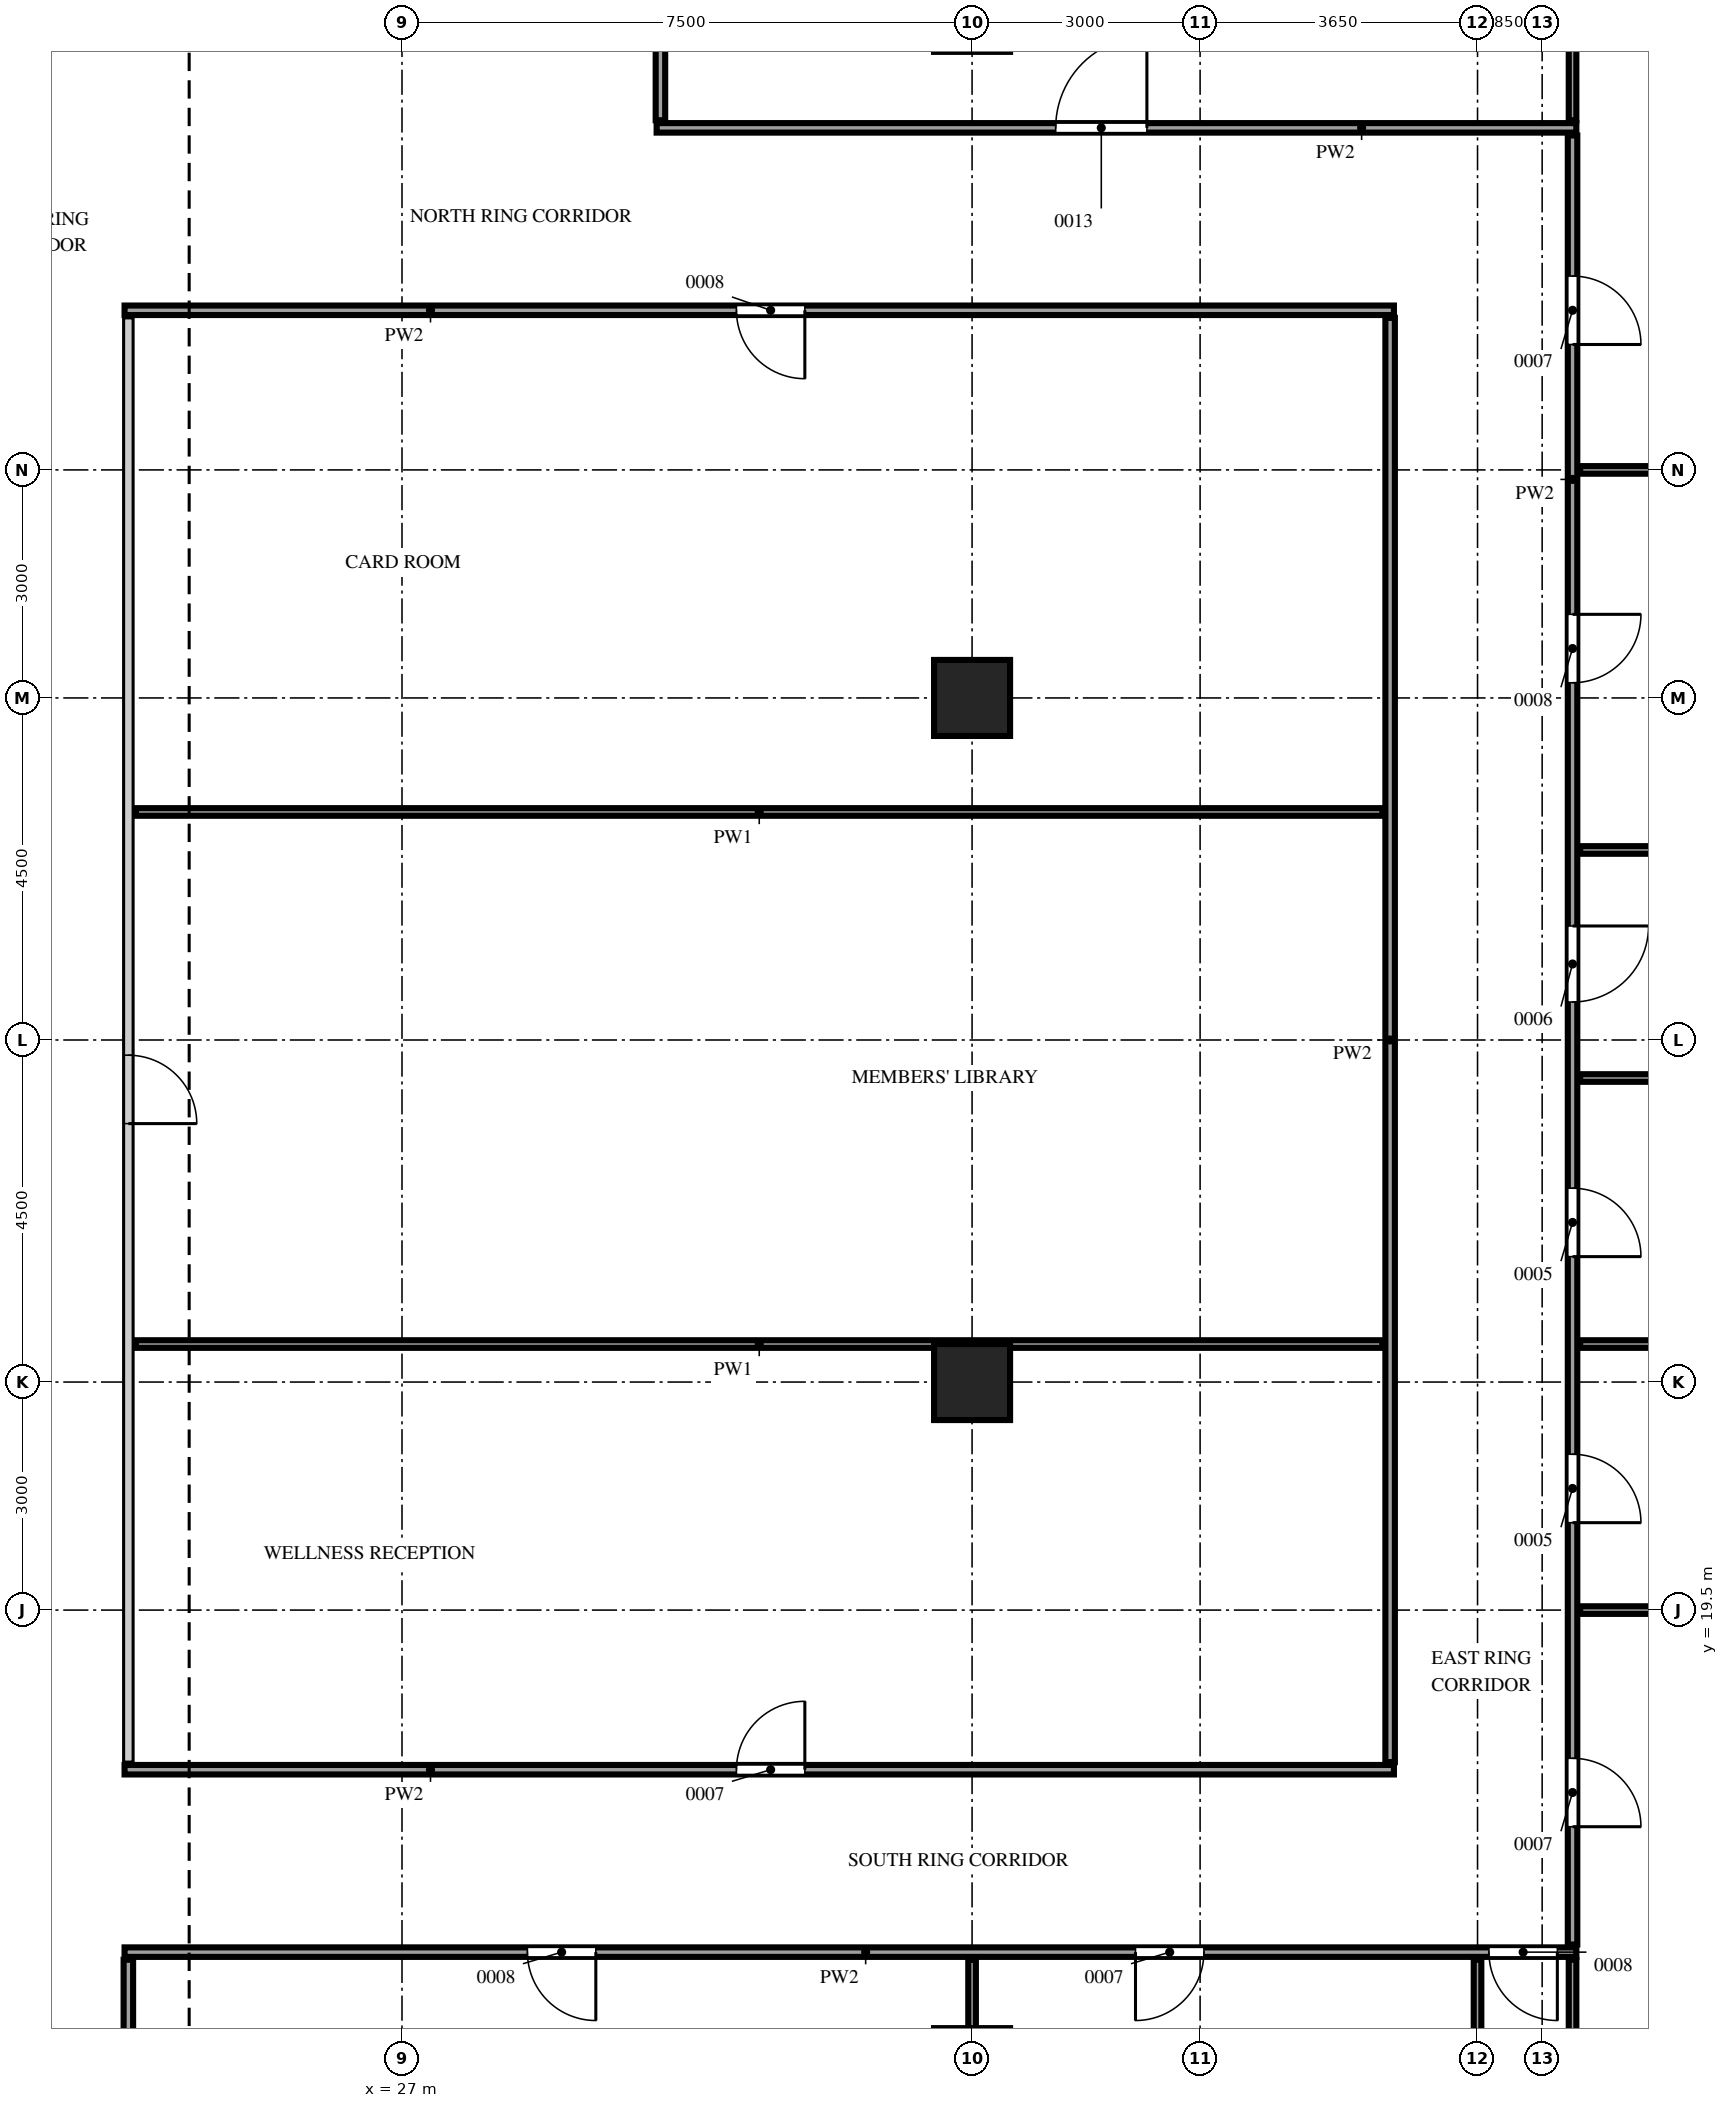
"""IFC4 building model, lengths in metres.
Left out: names, types, materials, properties, quantities, classifications, styles, units other than length and angle.
Written with IfcOpenShell. Run it as: python <this file> out.ifc"""

import sys

from ifc_helpers import new_model, si_unit, direction, frame, frame_2d, origin, origin_2d, place, context, subcontext, project, spatial, rectangle, extrude, source, transform, mapped, element, fill, save


model = new_model("IFC4")
c1 = context("Model", 3, precision=1e-05, world=origin(), true_north=direction((0.0, 1.0)))
c2 = subcontext(c1, "Body", "Model", "MODEL_VIEW")
j1 = project(units=[si_unit("LENGTHUNIT", "METRE"), si_unit("PLANEANGLEUNIT", "RADIAN")], contexts=[c1])
p1 = place(None, origin())
s1 = spatial("IfcSite", under=j1, at=p1, CompositionType="ELEMENT")
p2 = place(p1, origin())
s2 = spatial("IfcBuilding", under=s1, at=p2, CompositionType="ELEMENT")
p3 = place(p2, frame((0.0, 0.0, 294.2)))
s3 = spatial("IfcBuildingStorey", under=s2, at=p3, CompositionType="ELEMENT", Elevation=294.2)
m1 = source(origin(), c2, "Body", "SweptSolid", [
    extrude(rectangle(XDim=1.0, YDim=1.0, at=origin_2d()), origin(), (0.0, 0.0, 1.0), 3.75),
])
for number, where, z_axis, x_axis in (
    (1, (34.5, 22.5, 0.0), (0.0, 0.0, 1.0), (1.0, 0.0, 0.0)),
    (2, (34.5, 31.5, 0.0), (0.0, 0.0, 1.0), (1.0, 0.0, 0.0)),
):
    element("IfcColumn", number, at=place(p3, frame(where, z_axis=z_axis, x_axis=x_axis)), inside=s3, PredefinedType="COLUMN", context=c2, shape_type="MappedRepresentation", body=[
        mapped(m1, transform((0.0, 0.0, 0.0))),
    ])
m2 = source(origin(), c2, "Body", "SweptSolid", [
    extrude(rectangle(XDim=8.75, YDim=0.125, at=frame_2d((4.375, 0.0))), origin(), (0.0, 0.0, 1.0), 3.8),
])
p4 = place(p3, frame((23.4, 6.15, 0.0), z_axis=(0.0, 0.0, 1.0), x_axis=(0.0, 1.0, 0.0)))
e3 = element("IfcWall", 3, at=p4, inside=s3, PredefinedType="PARTITIONING", context=c2, shape_type="MappedRepresentation", body=[
    mapped(m2, transform((0.0, 0.0, 0.0))),
])
m3 = source(origin(), c2, "Body", "SweptSolid", [
    extrude(rectangle(XDim=8.75, YDim=0.1, at=frame_2d((4.375, 0.0))), origin(), (0.0, 0.0, 1.0), 3.35),
])
for number, where, z_axis, x_axis in (
    (4, (34.5, 6.15, 0.0), (0.0, 0.0, 1.0), (0.0, 1.0, 0.0)),
    (5, (41.15, 6.15, 0.0), (0.0, 0.0, 1.0), (0.0, 1.0, 0.0)),
):
    element("IfcWall", number, at=place(p3, frame(where, z_axis=z_axis, x_axis=x_axis)), inside=s3, PredefinedType="PARTITIONING", context=c2, shape_type="MappedRepresentation", body=[
        mapped(m3, transform((0.0, 0.0, 0.0))),
    ])
m4 = source(origin(), c2, "Body", "SweptSolid", [
    extrude(rectangle(XDim=2.75, YDim=0.1, at=frame_2d((1.375, 0.0))), origin(), (0.0, 0.0, 1.0), 3.8),
])
p5 = place(p3, frame((42.4, 12.15, 0.0), z_axis=(0.0, 0.0, 1.0), x_axis=(0.0, 1.0, 0.0)))
e6 = element("IfcWall", 6, at=p5, inside=s3, PredefinedType="PARTITIONING", context=c2, shape_type="MappedRepresentation", body=[
    mapped(m4, transform((0.0, 0.0, 0.0))),
])
m5 = source(origin(), c2, "Body", "SweptSolid", [
    extrude(rectangle(XDim=19.1, YDim=0.125, at=frame_2d((9.55, 0.0))), origin(), (0.0, 0.0, 1.0), 3.8),
])
p6 = place(p3, frame((23.35, 15.0, 0.0), z_axis=(0.0, 0.0, 1.0), x_axis=(1.0, 0.0, 0.0)))
e7 = element("IfcWall", 7, at=p6, inside=s3, PredefinedType="PARTITIONING", context=c2, shape_type="MappedRepresentation", body=[
    mapped(m5, transform((0.0, 0.0, 0.0))),
])
m6 = source(origin(), c2, "Body", "SweptSolid", [
    extrude(rectangle(XDim=0.9, YDim=2.1, at=frame_2d((0.45, 1.05))), frame((0.0, 0.073, 0.0), z_axis=(0.0, -1.0, 0.0), x_axis=(1.0, 0.0, 0.0)), (0.0, 0.0, 1.0), 0.145),
])
p7 = place(p6, frame((5.3, 0.0, 0.0)))
e8 = element("IfcOpeningElement", 8, at=p7, cuts=e7, PredefinedType="OPENING", context=c2, shape_type="MappedRepresentation", body=[
    mapped(m6, transform((0.0, 0.0, 0.0))),
])
p8 = place(p6, frame((13.3, 0.0, 0.0)))
e9 = element("IfcOpeningElement", 9, at=p8, cuts=e7, PredefinedType="OPENING", context=c2, shape_type="MappedRepresentation", body=[
    mapped(m6, transform((0.0, 0.0, 0.0))),
])
p9 = place(p6, frame((17.95, 0.0, 0.0)))
e10 = element("IfcOpeningElement", 10, at=p9, cuts=e7, PredefinedType="OPENING", context=c2, shape_type="MappedRepresentation", body=[
    mapped(m6, transform((0.0, 0.0, 0.0))),
])
m7 = source(origin(), c2, "Body", "SweptSolid", [
    extrude(rectangle(XDim=23.8, YDim=0.125, at=frame_2d((11.9, 0.0))), origin(), (0.0, 0.0, 1.0), 3.8),
])
p10 = place(p3, frame((42.4, 15.1, 0.0), z_axis=(0.0, 0.0, 1.0), x_axis=(0.0, 1.0, 0.0)))
e11 = element("IfcWall", 11, at=p10, inside=s3, PredefinedType="PARTITIONING", context=c2, shape_type="MappedRepresentation", body=[
    mapped(m7, transform((0.0, 0.0, 0.0))),
])
p11 = place(p10, frame((1.55, 0.0, 0.0)))
e12 = element("IfcOpeningElement", 12, at=p11, cuts=e11, PredefinedType="OPENING", context=c2, shape_type="MappedRepresentation", body=[
    mapped(m6, transform((0.0, 0.0, 0.0))),
])
p12 = place(p10, frame((5.55, 0.0, 0.0)))
e13 = element("IfcOpeningElement", 13, at=p12, cuts=e11, PredefinedType="OPENING", context=c2, shape_type="MappedRepresentation", body=[
    mapped(m6, transform((0.0, 0.0, 0.0))),
])
p13 = place(p10, frame((9.05, 0.0, 0.0)))
e14 = element("IfcOpeningElement", 14, at=p13, cuts=e11, PredefinedType="OPENING", context=c2, shape_type="MappedRepresentation", body=[
    mapped(m6, transform((0.0, 0.0, 0.0))),
])
m8 = source(origin(), c2, "Body", "SweptSolid", [
    extrude(rectangle(XDim=1.0, YDim=2.1, at=frame_2d((0.5, 1.05))), frame((0.0, 0.073, 0.0), z_axis=(0.0, -1.0, 0.0), x_axis=(1.0, 0.0, 0.0)), (0.0, 0.0, 1.0), 0.145),
])
p14 = place(p10, frame((12.4, 0.0, 0.0)))
e15 = element("IfcOpeningElement", 15, at=p14, cuts=e11, PredefinedType="OPENING", context=c2, shape_type="MappedRepresentation", body=[
    mapped(m8, transform((0.0, 0.0, 0.0))),
])
p15 = place(p10, frame((16.6, 0.0, 0.0)))
e16 = element("IfcOpeningElement", 16, at=p15, cuts=e11, PredefinedType="OPENING", context=c2, shape_type="MappedRepresentation", body=[
    mapped(m6, transform((0.0, 0.0, 0.0))),
])
p16 = place(p10, frame((21.05, 0.0, 0.0)))
e17 = element("IfcOpeningElement", 17, at=p16, cuts=e11, PredefinedType="OPENING", context=c2, shape_type="MappedRepresentation", body=[
    mapped(m6, transform((0.0, 0.0, 0.0))),
])
m9 = source(origin(), c2, "Body", "SweptSolid", [
    extrude(rectangle(XDim=16.7, YDim=0.125, at=frame_2d((8.35, 0.0))), origin(), (0.0, 0.0, 1.0), 3.8),
])
p17 = place(p3, frame((23.35, 17.4, 0.0), z_axis=(0.0, 0.0, 1.0), x_axis=(1.0, 0.0, 0.0)))
e18 = element("IfcWall", 18, at=p17, inside=s3, PredefinedType="PARTITIONING", context=c2, shape_type="MappedRepresentation", body=[
    mapped(m9, transform((0.0, 0.0, 0.0))),
])
p18 = place(p17, frame((8.05, 0.0, 0.0)))
e19 = element("IfcOpeningElement", 19, at=p18, cuts=e18, PredefinedType="OPENING", context=c2, shape_type="MappedRepresentation", body=[
    mapped(m6, transform((0.0, 0.0, 0.0))),
])
m10 = source(origin(), c2, "Body", "SweptSolid", [
    extrude(rectangle(XDim=19.0, YDim=0.125, at=frame_2d((9.5, 0.0))), origin(), (0.0, 0.0, 1.0), 3.8),
])
p19 = place(p3, frame((23.4, 17.5, 0.0), z_axis=(0.0, 0.0, 1.0), x_axis=(0.0, 1.0, 0.0)))
e20 = element("IfcWall", 20, at=p19, inside=s3, PredefinedType="PARTITIONING", context=c2, shape_type="MappedRepresentation", body=[
    mapped(m10, transform((0.0, 0.0, 0.0))),
])
p20 = place(p19, frame((8.4, 0.0, 0.0)))
e21 = element("IfcOpeningElement", 21, at=p20, cuts=e20, PredefinedType="OPENING", context=c2, shape_type="MappedRepresentation", body=[
    mapped(m6, transform((0.0, 0.0, 0.0))),
])
p21 = place(p3, frame((40.0, 17.5, 0.0), z_axis=(0.0, 0.0, 1.0), x_axis=(0.0, 1.0, 0.0)))
e22 = element("IfcWall", 22, at=p21, inside=s3, PredefinedType="PARTITIONING", context=c2, shape_type="MappedRepresentation", body=[
    mapped(m10, transform((0.0, 0.0, 0.0))),
])
m11 = source(origin(), c2, "Body", "SweptSolid", [
    extrude(rectangle(XDim=5.35, YDim=0.1, at=frame_2d((2.675, 0.0))), origin(), (0.0, 0.0, 1.0), 3.8),
])
p22 = place(p3, frame((42.5, 19.5, 0.0), z_axis=(0.0, 0.0, 1.0), x_axis=(1.0, 0.0, 0.0)))
e23 = element("IfcWall", 23, at=p22, inside=s3, PredefinedType="PARTITIONING", context=c2, shape_type="MappedRepresentation", body=[
    mapped(m11, transform((0.0, 0.0, 0.0))),
])
m12 = source(origin(), c2, "Body", "SweptSolid", [
    extrude(rectangle(XDim=16.4, YDim=0.1, at=frame_2d((8.2, 0.0))), origin(), (0.0, 0.0, 1.0), 3.8),
])
p23 = place(p3, frame((23.5, 23.0, 0.0), z_axis=(0.0, 0.0, 1.0), x_axis=(1.0, 0.0, 0.0)))
e24 = element("IfcWall", 24, at=p23, inside=s3, PredefinedType="PARTITIONING", context=c2, shape_type="MappedRepresentation", body=[
    mapped(m12, transform((0.0, 0.0, 0.0))),
])
for number, where, z_axis, x_axis in (
    (25, (42.5, 23.0, 0.0), (0.0, 0.0, 1.0), (1.0, 0.0, 0.0)),
    (26, (42.5, 26.5, 0.0), (0.0, 0.0, 1.0), (1.0, 0.0, 0.0)),
    (27, (42.5, 29.5, 0.0), (0.0, 0.0, 1.0), (1.0, 0.0, 0.0)),
):
    element("IfcWall", number, at=place(p3, frame(where, z_axis=z_axis, x_axis=x_axis)), inside=s3, PredefinedType="PARTITIONING", context=c2, shape_type="MappedRepresentation", body=[
        mapped(m11, transform((0.0, 0.0, 0.0))),
    ])
p24 = place(p3, frame((23.5, 30.0, 0.0), z_axis=(0.0, 0.0, 1.0), x_axis=(1.0, 0.0, 0.0)))
e28 = element("IfcWall", 28, at=p24, inside=s3, PredefinedType="PARTITIONING", context=c2, shape_type="MappedRepresentation", body=[
    mapped(m12, transform((0.0, 0.0, 0.0))),
])
p25 = place(p3, frame((42.5, 34.5, 0.0), z_axis=(0.0, 0.0, 1.0), x_axis=(1.0, 0.0, 0.0)))
e29 = element("IfcWall", 29, at=p25, inside=s3, PredefinedType="PARTITIONING", context=c2, shape_type="MappedRepresentation", body=[
    mapped(m11, transform((0.0, 0.0, 0.0))),
])
p26 = place(p3, frame((23.35, 36.6, 0.0), z_axis=(0.0, 0.0, 1.0), x_axis=(1.0, 0.0, 0.0)))
e30 = element("IfcWall", 30, at=p26, inside=s3, PredefinedType="PARTITIONING", context=c2, shape_type="MappedRepresentation", body=[
    mapped(m9, transform((0.0, 0.0, 0.0))),
])
p27 = place(p26, frame((8.05, 0.0, 0.0)))
e31 = element("IfcOpeningElement", 31, at=p27, cuts=e30, PredefinedType="OPENING", context=c2, shape_type="MappedRepresentation", body=[
    mapped(m6, transform((0.0, 0.0, 0.0))),
])
m13 = source(origin(), c2, "Body", "SweptSolid", [
    extrude(rectangle(XDim=12.1, YDim=0.125, at=frame_2d((6.05, 0.0))), origin(), (0.0, 0.0, 1.0), 3.8),
])
p28 = place(p3, frame((30.35, 39.0, 0.0), z_axis=(0.0, 0.0, 1.0), x_axis=(1.0, 0.0, 0.0)))
e32 = element("IfcWall", 32, at=p28, inside=s3, PredefinedType="PARTITIONING", context=c2, shape_type="MappedRepresentation", body=[
    mapped(m13, transform((0.0, 0.0, 0.0))),
])
m14 = source(origin(), c2, "Body", "SweptSolid", [
    extrude(rectangle(XDim=1.2, YDim=2.1, at=frame_2d((0.6, 1.05))), frame((0.0, 0.073, 0.0), z_axis=(0.0, -1.0, 0.0), x_axis=(1.0, 0.0, 0.0)), (0.0, 0.0, 1.0), 0.145),
])
p29 = place(p28, frame((5.25, 0.0, 0.0)))
e33 = element("IfcOpeningElement", 33, at=p29, cuts=e32, PredefinedType="OPENING", context=c2, shape_type="MappedRepresentation", body=[
    mapped(m14, transform((0.0, 0.0, 0.0))),
])
p30 = place(p3, frame((30.4, 39.1, 0.0), z_axis=(0.0, 0.0, 1.0), x_axis=(0.0, 1.0, 0.0)))
e34 = element("IfcWall", 34, at=p30, inside=s3, PredefinedType="PARTITIONING", context=c2, shape_type="MappedRepresentation", body=[
    mapped(m2, transform((0.0, 0.0, 0.0))),
])
p31 = place(p3, frame((42.4, 39.1, 0.0), z_axis=(0.0, 0.0, 1.0), x_axis=(0.0, 1.0, 0.0)))
e35 = element("IfcWall", 35, at=p31, inside=s3, PredefinedType="PARTITIONING", context=c2, shape_type="MappedRepresentation", body=[
    mapped(m4, transform((0.0, 0.0, 0.0))),
])
m15 = source(origin(), c2, "Body", "SweptSolid", [
    extrude(rectangle(XDim=0.9, YDim=2.1, at=frame_2d((0.45, 1.05))), frame((0.0, 0.025, 0.0), z_axis=(0.0, -1.0, 0.0), x_axis=(1.0, 0.0, 0.0)), (0.0, 0.0, 1.0), 0.05),
])
p32 = place(p7, origin())
e36 = element("IfcDoor", 36, at=p32, inside=s3, OperationType="SINGLE_SWING_RIGHT", PredefinedType="DOOR", context=c2, shape_type="MappedRepresentation", body=[
    mapped(m15, transform((0.0, 0.0, 0.0))),
])
fill(e8, e36)
p33 = place(p8, origin())
e37 = element("IfcDoor", 37, at=p33, inside=s3, OperationType="SINGLE_SWING_LEFT", PredefinedType="DOOR", context=c2, shape_type="MappedRepresentation", body=[
    mapped(m15, transform((0.0, 0.0, 0.0))),
])
fill(e9, e37)
p34 = place(p9, origin())
e38 = element("IfcDoor", 38, at=p34, inside=s3, OperationType="SINGLE_SWING_RIGHT", PredefinedType="DOOR", context=c2, shape_type="MappedRepresentation", body=[
    mapped(m15, transform((0.0, 0.0, 0.0))),
])
fill(e10, e38)
p35 = place(p11, origin())
e39 = element("IfcDoor", 39, at=p35, inside=s3, OperationType="SINGLE_SWING_LEFT", PredefinedType="DOOR", context=c2, shape_type="MappedRepresentation", body=[
    mapped(m15, transform((0.0, 0.0, 0.0))),
])
fill(e12, e39)
p36 = place(p12, origin())
e40 = element("IfcDoor", 40, at=p36, inside=s3, OperationType="SINGLE_SWING_LEFT", PredefinedType="DOOR", context=c2, shape_type="MappedRepresentation", body=[
    mapped(m15, transform((0.0, 0.0, 0.0))),
])
fill(e13, e40)
p37 = place(p13, origin())
e41 = element("IfcDoor", 41, at=p37, inside=s3, OperationType="SINGLE_SWING_LEFT", PredefinedType="DOOR", context=c2, shape_type="MappedRepresentation", body=[
    mapped(m15, transform((0.0, 0.0, 0.0))),
])
fill(e14, e41)
m16 = source(origin(), c2, "Body", "SweptSolid", [
    extrude(rectangle(XDim=1.0, YDim=2.1, at=frame_2d((0.5, 1.05))), frame((0.0, 0.025, 0.0), z_axis=(0.0, -1.0, 0.0), x_axis=(1.0, 0.0, 0.0)), (0.0, 0.0, 1.0), 0.05),
])
p38 = place(p14, origin())
e42 = element("IfcDoor", 42, at=p38, inside=s3, OperationType="SINGLE_SWING_RIGHT", PredefinedType="DOOR", context=c2, shape_type="MappedRepresentation", body=[
    mapped(m16, transform((0.0, 0.0, 0.0))),
])
fill(e15, e42)
p39 = place(p15, origin())
e43 = element("IfcDoor", 43, at=p39, inside=s3, OperationType="SINGLE_SWING_RIGHT", PredefinedType="DOOR", context=c2, shape_type="MappedRepresentation", body=[
    mapped(m15, transform((0.0, 0.0, 0.0))),
])
fill(e16, e43)
p40 = place(p16, origin())
e44 = element("IfcDoor", 44, at=p40, inside=s3, OperationType="SINGLE_SWING_LEFT", PredefinedType="DOOR", context=c2, shape_type="MappedRepresentation", body=[
    mapped(m15, transform((0.0, 0.0, 0.0))),
])
fill(e17, e44)
m17 = source(origin(), c2, "Body", "SweptSolid", [
    extrude(rectangle(XDim=1.2, YDim=2.1, at=frame_2d((0.6, 1.05))), frame((0.0, 0.025, 0.0), z_axis=(0.0, -1.0, 0.0), x_axis=(1.0, 0.0, 0.0)), (0.0, 0.0, 1.0), 0.05),
])
p41 = place(p29, origin())
e45 = element("IfcDoor", 45, at=p41, inside=s3, OperationType="SINGLE_SWING_LEFT", PredefinedType="DOOR", context=c2, shape_type="MappedRepresentation", body=[
    mapped(m17, transform((0.0, 0.0, 0.0))),
])
fill(e33, e45)
p42 = place(p18, origin())
e46 = element("IfcDoor", 46, at=p42, inside=s3, OperationType="SINGLE_SWING_LEFT", PredefinedType="DOOR", context=c2, shape_type="MappedRepresentation", body=[
    mapped(m15, transform((0.0, 0.0, 0.0))),
])
fill(e19, e46)
p43 = place(p20, origin())
e47 = element("IfcDoor", 47, at=p43, inside=s3, OperationType="SINGLE_SWING_LEFT", PredefinedType="DOOR", context=c2, shape_type="MappedRepresentation", body=[
    mapped(m15, transform((0.0, 0.0, 0.0))),
])
fill(e21, e47)
p44 = place(p27, origin())
e48 = element("IfcDoor", 48, at=p44, inside=s3, OperationType="SINGLE_SWING_RIGHT", PredefinedType="DOOR", context=c2, shape_type="MappedRepresentation", body=[
    mapped(m15, transform((0.0, 0.0, 0.0))),
])
fill(e31, e48)
save(model, sys.argv[1])
